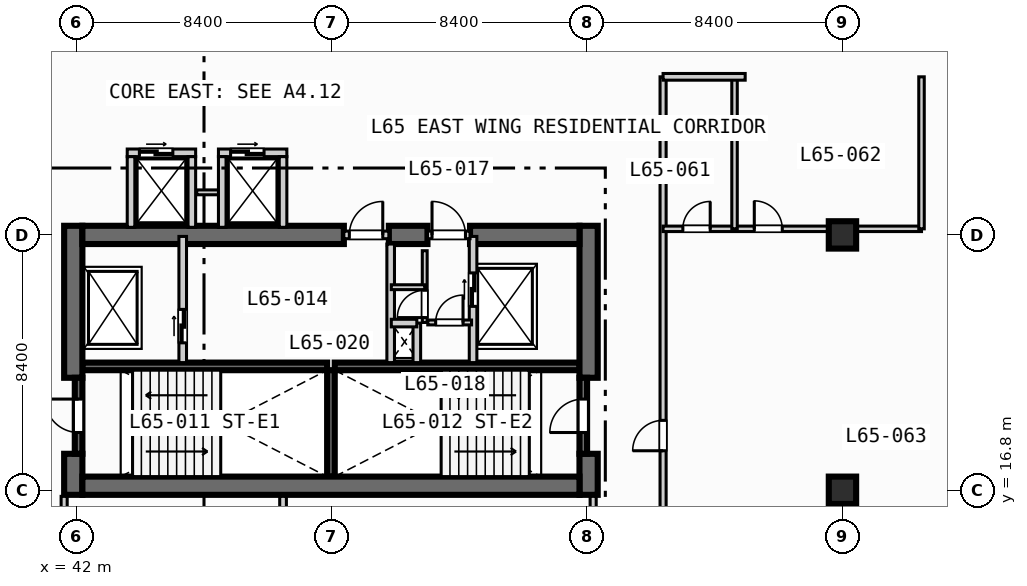
"""IFC4 building model, lengths in metres.
Left out: names, types, materials, properties, quantities, classifications, styles, units other than length and angle.
Written with IfcOpenShell. Run it as: python <this file> out.ifc"""

import sys

from ifc_helpers import new_model, si_unit, direction, frame, frame_2d, origin, origin_2d, place, context, subcontext, project, spatial, rectangle, extrude, element, fill, save


model = new_model("IFC4")
c1 = context("Model", 3, precision=1e-05, world=origin(), true_north=direction((0.0, 1.0)))
c2 = subcontext(c1, "Body", "Model", "MODEL_VIEW")
j1 = project(units=[si_unit("LENGTHUNIT", "METRE"), si_unit("PLANEANGLEUNIT", "RADIAN")], contexts=[c1])
p1 = place(None, origin())
s1 = spatial("IfcSite", under=j1, at=p1, CompositionType="ELEMENT")
p2 = place(p1, origin())
s2 = spatial("IfcBuilding", under=s1, at=p2, CompositionType="ELEMENT")
p3 = place(p2, frame((0.0, 0.0, 263.8)))
s3 = spatial("IfcBuildingStorey", under=s2, at=p3, CompositionType="ELEMENT", Elevation=263.8)
for number, where, z_axis, x_axis in (
    (1, (42.2, 20.875, 0.0), (0.0, 0.0, 1.0), (1.0, 0.0, 0.0)),
    (2, (50.5, 20.875, 0.0), (0.0, 0.0, 1.0), (1.0, 0.0, 0.0)),
):
    element("IfcWall", number, at=place(p3, frame(where, z_axis=z_axis, x_axis=x_axis)), inside=s3, PredefinedType="SOLIDWALL", context=c2, shape_type="SweptSolid", body=[
        extrude(rectangle(XDim=8.05, YDim=0.25, at=frame_2d((4.025, 0.0))), origin(), (0.0, 0.0, 1.0), 3.47),
    ])
p4 = place(p3, frame((50.375, 17.25, 0.0), z_axis=(0.0, 0.0, 1.0), x_axis=(0.0, 1.0, 0.0)))
e3 = element("IfcWall", 3, at=p4, inside=s3, PredefinedType="SOLIDWALL", context=c2, shape_type="SweptSolid", body=[
    extrude(rectangle(XDim=3.5, YDim=0.25, at=frame_2d((1.75, 0.0))), origin(), (0.0, 0.0, 1.0), 3.47),
])
p5 = place(p3, frame((41.9, 16.65, 0.0), z_axis=(0.0, 0.0, 1.0), x_axis=(0.0, 1.0, 0.0)))
e4 = element("IfcWall", 4, at=p5, inside=s3, PredefinedType="SHEAR", context=c2, shape_type="SweptSolid", body=[
    extrude(rectangle(XDim=1.35, YDim=0.6, at=frame_2d((0.675, 0.0))), origin(), (0.0, 0.0, 1.0), 3.47),
])
p6 = place(p3, frame((41.9, 20.5, 0.0), z_axis=(0.0, 0.0, 1.0), x_axis=(0.0, 1.0, 0.0)))
e5 = element("IfcWall", 5, at=p6, inside=s3, PredefinedType="SHEAR", context=c2, shape_type="SweptSolid", body=[
    extrude(rectangle(XDim=5.0, YDim=0.6, at=frame_2d((2.5, 0.0))), origin(), (0.0, 0.0, 1.0), 3.47),
])
p7 = place(p3, frame((58.85, 16.65, 0.0), z_axis=(0.0, 0.0, 1.0), x_axis=(0.0, 1.0, 0.0)))
e6 = element("IfcWall", 6, at=p7, inside=s3, PredefinedType="SHEAR", context=c2, shape_type="SweptSolid", body=[
    extrude(rectangle(XDim=1.35, YDim=0.6, at=frame_2d((0.675, 0.0))), origin(), (0.0, 0.0, 1.0), 3.47),
])
p8 = place(p3, frame((58.85, 20.5, 0.0), z_axis=(0.0, 0.0, 1.0), x_axis=(0.0, 1.0, 0.0)))
e7 = element("IfcWall", 7, at=p8, inside=s3, PredefinedType="SHEAR", context=c2, shape_type="SweptSolid", body=[
    extrude(rectangle(XDim=5.0, YDim=0.6, at=frame_2d((2.5, 0.0))), origin(), (0.0, 0.0, 1.0), 3.47),
])
p9 = place(p3, frame((42.2, 16.95, 0.0), z_axis=(0.0, 0.0, 1.0), x_axis=(1.0, 0.0, 0.0)))
e8 = element("IfcWall", 8, at=p9, inside=s3, PredefinedType="SHEAR", context=c2, shape_type="SweptSolid", body=[
    extrude(rectangle(XDim=16.35, YDim=0.6, at=frame_2d((8.175, 0.0))), origin(), (0.0, 0.0, 1.0), 3.47),
])
p10 = place(p3, frame((42.2, 25.2, 0.0), z_axis=(0.0, 0.0, 1.0), x_axis=(1.0, 0.0, 0.0)))
e9 = element("IfcWall", 9, at=p10, inside=s3, PredefinedType="SHEAR", context=c2, shape_type="SweptSolid", body=[
    extrude(rectangle(XDim=8.6, YDim=0.6, at=frame_2d((4.3, 0.0))), origin(), (0.0, 0.0, 1.0), 3.47),
])
p11 = place(p3, frame((52.28, 25.2, 0.0), z_axis=(0.0, 0.0, 1.0), x_axis=(1.0, 0.0, 0.0)))
e10 = element("IfcWall", 10, at=p11, inside=s3, PredefinedType="SHEAR", context=c2, shape_type="SweptSolid", body=[
    extrude(rectangle(XDim=1.27, YDim=0.6, at=frame_2d((0.635, 0.0))), origin(), (0.0, 0.0, 1.0), 3.47),
])
p12 = place(p3, frame((54.95, 25.2, 0.0), z_axis=(0.0, 0.0, 1.0), x_axis=(1.0, 0.0, 0.0)))
e11 = element("IfcWall", 11, at=p12, inside=s3, PredefinedType="SHEAR", context=c2, shape_type="SweptSolid", body=[
    extrude(rectangle(XDim=3.6, YDim=0.6, at=frame_2d((1.8, 0.0))), origin(), (0.0, 0.0, 1.0), 3.47),
])
for number, where, z_axis, x_axis in (
    (12, (67.2, 16.8, 0.0), (0.0, 0.0, 1.0), (1.0, 0.0, 0.0)),
    (13, (67.2, 25.2, 0.0), (0.0, 0.0, 1.0), (1.0, 0.0, 0.0)),
):
    element("IfcColumn", number, at=place(p3, frame(where, z_axis=z_axis, x_axis=x_axis)), inside=s3, PredefinedType="COLUMN", context=c2, shape_type="SweptSolid", body=[
        extrude(rectangle(XDim=0.9, YDim=0.9, at=origin_2d()), origin(), (0.0, 0.0, 1.0), 3.7),
    ])
p13 = place(p3, frame((42.075, 18.0, 0.0), z_axis=(0.0, 0.0, 1.0), x_axis=(0.0, 1.0, 0.0)))
e14 = element("IfcWall", 14, at=p13, inside=s3, PredefinedType="SOLIDWALL", context=c2, shape_type="SweptSolid", body=[
    extrude(rectangle(XDim=2.5, YDim=0.25, at=frame_2d((1.25, 0.0))), origin(), (0.0, 0.0, 1.0), 3.47),
])
p14 = place(p13, frame((0.7, 0.0, 0.0)))
e15 = element("IfcOpeningElement", 15, at=p14, cuts=e14, PredefinedType="OPENING", context=c2, shape_type="SweptSolid", body=[
    extrude(rectangle(XDim=1.1, YDim=2.15, at=frame_2d((0.55, 1.075))), frame((0.0, 0.135, 0.0), z_axis=(0.0, -1.0, 0.0), x_axis=(1.0, 0.0, 0.0)), (0.0, 0.0, 1.0), 0.27),
])
p15 = place(p3, frame((58.675, 18.0, 0.0), z_axis=(0.0, 0.0, 1.0), x_axis=(0.0, 1.0, 0.0)))
e16 = element("IfcWall", 16, at=p15, inside=s3, PredefinedType="SOLIDWALL", context=c2, shape_type="SweptSolid", body=[
    extrude(rectangle(XDim=2.5, YDim=0.25, at=frame_2d((1.25, 0.0))), origin(), (0.0, 0.0, 1.0), 3.47),
])
p16 = place(p15, frame((0.7, 0.0, 0.0)))
e17 = element("IfcOpeningElement", 17, at=p16, cuts=e16, PredefinedType="OPENING", context=c2, shape_type="SweptSolid", body=[
    extrude(rectangle(XDim=1.1, YDim=2.15, at=frame_2d((0.55, 1.075))), frame((0.0, 0.135, 0.0), z_axis=(0.0, -1.0, 0.0), x_axis=(1.0, 0.0, 0.0)), (0.0, 0.0, 1.0), 0.27),
])
p17 = place(p3, frame((45.5, 21.0, 0.0), z_axis=(0.0, 0.0, 1.0), x_axis=(0.0, 1.0, 0.0)))
e18 = element("IfcWall", 18, at=p17, inside=s3, PredefinedType="SOLIDWALL", context=c2, shape_type="SweptSolid", body=[
    extrude(rectangle(XDim=4.15, YDim=0.25, at=frame_2d((2.075, 0.0))), origin(), (0.0, 0.0, 1.0), 3.47),
])
p18 = place(p17, frame((0.65, 0.0, 0.0)))
e19 = element("IfcOpeningElement", 19, at=p18, cuts=e18, PredefinedType="OPENING", context=c2, shape_type="SweptSolid", body=[
    extrude(rectangle(XDim=1.1, YDim=2.15, at=frame_2d((0.55, 1.075))), frame((0.0, 0.135, 0.0), z_axis=(0.0, -1.0, 0.0), x_axis=(1.0, 0.0, 0.0)), (0.0, 0.0, 1.0), 0.27),
])
p19 = place(p3, frame((50.8, 25.2, 0.0), z_axis=(0.0, 0.0, 1.0), x_axis=(1.0, 0.0, 0.0)))
e20 = element("IfcWall", 20, at=p19, inside=s3, PredefinedType="SOLIDWALL", context=c2, shape_type="SweptSolid", body=[
    extrude(rectangle(XDim=1.48, YDim=0.25, at=frame_2d((0.74, 0.0))), origin(), (0.0, 0.0, 1.0), 3.47),
])
p20 = place(p19, frame((0.18, 0.0, 0.0)))
e21 = element("IfcOpeningElement", 21, at=p20, cuts=e20, PredefinedType="OPENING", context=c2, shape_type="SweptSolid", body=[
    extrude(rectangle(XDim=1.1, YDim=2.15, at=frame_2d((0.55, 1.075))), frame((0.0, 0.135, 0.0), z_axis=(0.0, -1.0, 0.0), x_axis=(1.0, 0.0, 0.0)), (0.0, 0.0, 1.0), 0.27),
])
p21 = place(p3, frame((52.34, 21.0, 0.0), z_axis=(0.0, 0.0, 1.0), x_axis=(0.0, 1.0, 0.0)))
e22 = element("IfcWall", 22, at=p21, inside=s3, PredefinedType="SOLIDWALL", context=c2, shape_type="SweptSolid", body=[
    extrude(rectangle(XDim=3.9, YDim=0.25, at=frame_2d((1.95, 0.0))), origin(), (0.0, 0.0, 1.0), 3.47),
])
p22 = place(p3, frame((55.05, 21.0, 0.0), z_axis=(0.0, 0.0, 1.0), x_axis=(0.0, 1.0, 0.0)))
e23 = element("IfcWall", 23, at=p22, inside=s3, PredefinedType="SOLIDWALL", context=c2, shape_type="SweptSolid", body=[
    extrude(rectangle(XDim=4.15, YDim=0.25, at=frame_2d((2.075, 0.0))), origin(), (0.0, 0.0, 1.0), 3.47),
])
p23 = place(p22, frame((1.85, 0.0, 0.0)))
e24 = element("IfcOpeningElement", 24, at=p23, cuts=e23, PredefinedType="OPENING", context=c2, shape_type="SweptSolid", body=[
    extrude(rectangle(XDim=1.1, YDim=2.15, at=frame_2d((0.55, 1.075))), frame((0.0, 0.135, 0.0), z_axis=(0.0, -1.0, 0.0), x_axis=(1.0, 0.0, 0.0)), (0.0, 0.0, 1.0), 0.27),
])
p24 = place(p3, frame((53.55, 25.2, 0.0), z_axis=(0.0, 0.0, 1.0), x_axis=(1.0, 0.0, 0.0)))
e25 = element("IfcWall", 25, at=p24, inside=s3, PredefinedType="SOLIDWALL", context=c2, shape_type="SweptSolid", body=[
    extrude(rectangle(XDim=1.4, YDim=0.25, at=frame_2d((0.7, 0.0))), origin(), (0.0, 0.0, 1.0), 3.47),
])
p25 = place(p24, frame((0.15, 0.0, 0.0)))
e26 = element("IfcOpeningElement", 26, at=p25, cuts=e25, PredefinedType="OPENING", context=c2, shape_type="SweptSolid", body=[
    extrude(rectangle(XDim=1.1, YDim=2.15, at=frame_2d((0.55, 1.075))), frame((0.0, 0.135, 0.0), z_axis=(0.0, -1.0, 0.0), x_axis=(1.0, 0.0, 0.0)), (0.0, 0.0, 1.0), 0.27),
])
p26 = place(p3, frame((53.2, 21.0, 0.0), z_axis=(0.0, 0.0, 1.0), x_axis=(0.0, 1.0, 0.0)))
e27 = element("IfcWall", 27, at=p26, inside=s3, PredefinedType="SOLIDWALL", context=c2, shape_type="SweptSolid", body=[
    extrude(rectangle(XDim=1.3, YDim=0.25, at=frame_2d((0.65, 0.0))), origin(), (0.0, 0.0, 1.0), 3.47),
])
p27 = place(p3, frame((52.36, 22.3, 0.0), z_axis=(0.0, 0.0, 1.0), x_axis=(1.0, 0.0, 0.0)))
e28 = element("IfcWall", 28, at=p27, inside=s3, PredefinedType="SOLIDWALL", context=c2, shape_type="SweptSolid", body=[
    extrude(rectangle(XDim=0.84, YDim=0.25, at=frame_2d((0.42, 0.0))), origin(), (0.0, 0.0, 1.0), 3.47),
])
p28 = place(p3, frame((53.56, 22.32, 0.0), z_axis=(0.0, 0.0, 1.0), x_axis=(1.0, 0.0, 0.0)))
e29 = element("IfcWall", 29, at=p28, inside=s3, PredefinedType="PARTITIONING", context=c2, shape_type="SweptSolid", body=[
    extrude(rectangle(XDim=1.44, YDim=0.16, at=frame_2d((0.72, 0.0))), origin(), (0.0, 0.0, 1.0), 3.47),
])
p29 = place(p28, frame((0.26, 0.0, 0.0)))
e30 = element("IfcOpeningElement", 30, at=p29, cuts=e29, PredefinedType="OPENING", context=c2, shape_type="SweptSolid", body=[
    extrude(rectangle(XDim=0.9, YDim=2.1, at=frame_2d((0.45, 1.05))), frame((0.0, 0.09, 0.0), z_axis=(0.0, -1.0, 0.0), x_axis=(1.0, 0.0, 0.0)), (0.0, 0.0, 1.0), 0.18),
])
p30 = place(p3, frame((53.46, 22.32, 0.0), z_axis=(0.0, 0.0, 1.0), x_axis=(0.0, 1.0, 0.0)))
e31 = element("IfcWall", 31, at=p30, inside=s3, PredefinedType="PARTITIONING", context=c2, shape_type="SweptSolid", body=[
    extrude(rectangle(XDim=2.36, YDim=0.16, at=frame_2d((1.18, 0.0))), origin(), (0.0, 0.0, 1.0), 3.47),
])
p31 = place(p30, frame((0.16, 0.0, 0.0)))
e32 = element("IfcOpeningElement", 32, at=p31, cuts=e31, PredefinedType="OPENING", context=c2, shape_type="SweptSolid", body=[
    extrude(rectangle(XDim=0.9, YDim=2.1, at=frame_2d((0.45, 1.05))), frame((0.0, 0.09, 0.0), z_axis=(0.0, -1.0, 0.0), x_axis=(1.0, 0.0, 0.0)), (0.0, 0.0, 1.0), 0.18),
])
p32 = place(p3, frame((52.36, 23.48, 0.0), z_axis=(0.0, 0.0, 1.0), x_axis=(1.0, 0.0, 0.0)))
e33 = element("IfcWall", 33, at=p32, inside=s3, PredefinedType="PARTITIONING", context=c2, shape_type="SweptSolid", body=[
    extrude(rectangle(XDim=1.1, YDim=0.16, at=frame_2d((0.55, 0.0))), origin(), (0.0, 0.0, 1.0), 3.47),
])
p33 = place(p3, frame((43.675, 27.9, 0.0), z_axis=(0.0, 0.0, 1.0), x_axis=(1.0, 0.0, 0.0)))
e34 = element("IfcWall", 34, at=p33, inside=s3, PredefinedType="SOLIDWALL", context=c2, shape_type="SweptSolid", body=[
    extrude(rectangle(XDim=2.25, YDim=0.25, at=frame_2d((1.125, 0.0))), origin(), (0.0, 0.0, 1.0), 3.47),
])
p34 = place(p33, frame((0.4, 0.0, 0.0)))
e35 = element("IfcOpeningElement", 35, at=p34, cuts=e34, PredefinedType="OPENING", context=c2, shape_type="SweptSolid", body=[
    extrude(rectangle(XDim=1.1, YDim=2.15, at=frame_2d((0.55, 1.075))), frame((0.0, 0.135, 0.0), z_axis=(0.0, -1.0, 0.0), x_axis=(1.0, 0.0, 0.0)), (0.0, 0.0, 1.0), 0.27),
])
for number, where, z_axis, x_axis in (
    (36, (43.8, 25.45, 0.0), (0.0, 0.0, 1.0), (0.0, 1.0, 0.0)),
    (37, (45.8, 25.45, 0.0), (0.0, 0.0, 1.0), (0.0, 1.0, 0.0)),
):
    element("IfcWall", number, at=place(p3, frame(where, z_axis=z_axis, x_axis=x_axis)), inside=s3, PredefinedType="SOLIDWALL", context=c2, shape_type="SweptSolid", body=[
        extrude(rectangle(XDim=2.325, YDim=0.25, at=frame_2d((1.163, 0.0))), origin(), (0.0, 0.0, 1.0), 3.47),
    ])
p35 = place(p3, frame((45.96, 26.6, 0.0), z_axis=(0.0, 0.0, 1.0), x_axis=(1.0, 0.0, 0.0)))
e38 = element("IfcWall", 38, at=p35, inside=s3, PredefinedType="PARTITIONING", context=c2, shape_type="SweptSolid", body=[
    extrude(rectangle(XDim=0.88, YDim=0.16, at=frame_2d((0.44, 0.0))), origin(), (0.0, 0.0, 1.0), 3.47),
])
p36 = place(p3, frame((46.675, 27.9, 0.0), z_axis=(0.0, 0.0, 1.0), x_axis=(1.0, 0.0, 0.0)))
e39 = element("IfcWall", 39, at=p36, inside=s3, PredefinedType="SOLIDWALL", context=c2, shape_type="SweptSolid", body=[
    extrude(rectangle(XDim=2.25, YDim=0.25, at=frame_2d((1.125, 0.0))), origin(), (0.0, 0.0, 1.0), 3.47),
])
p37 = place(p36, frame((0.4, 0.0, 0.0)))
e40 = element("IfcOpeningElement", 40, at=p37, cuts=e39, PredefinedType="OPENING", context=c2, shape_type="SweptSolid", body=[
    extrude(rectangle(XDim=1.1, YDim=2.15, at=frame_2d((0.55, 1.075))), frame((0.0, 0.135, 0.0), z_axis=(0.0, -1.0, 0.0), x_axis=(1.0, 0.0, 0.0)), (0.0, 0.0, 1.0), 0.27),
])
for number, where, z_axis, x_axis in (
    (41, (46.8, 25.45, 0.0), (0.0, 0.0, 1.0), (0.0, 1.0, 0.0)),
    (42, (48.8, 25.45, 0.0), (0.0, 0.0, 1.0), (0.0, 1.0, 0.0)),
):
    element("IfcWall", number, at=place(p3, frame(where, z_axis=z_axis, x_axis=x_axis)), inside=s3, PredefinedType="SOLIDWALL", context=c2, shape_type="SweptSolid", body=[
        extrude(rectangle(XDim=2.325, YDim=0.25, at=frame_2d((1.163, 0.0))), origin(), (0.0, 0.0, 1.0), 3.47),
    ])
p38 = place(p3, frame((41.6, 8.65, 0.0), z_axis=(0.0, 0.0, 1.0), x_axis=(0.0, 1.0, 0.0)))
e43 = element("IfcWall", 43, at=p38, inside=s3, PredefinedType="PARTITIONING", context=c2, shape_type="SweptSolid", body=[
    extrude(rectangle(XDim=7.95, YDim=0.2, at=frame_2d((3.975, 0.0))), origin(), (0.0, 0.0, 1.0), 3.47),
])
p39 = place(p38, frame((2.2, 0.0, 0.0)))
e44 = element("IfcOpeningElement", 44, at=p39, cuts=e43, PredefinedType="OPENING", context=c2, shape_type="SweptSolid", body=[
    extrude(rectangle(XDim=0.92, YDim=2.1, at=frame_2d((0.46, 1.05))), frame((0.0, 0.11, 0.0), z_axis=(0.0, -1.0, 0.0), x_axis=(1.0, 0.0, 0.0)), (0.0, 0.0, 1.0), 0.22),
])
p40 = place(p3, frame((59.0, 8.65, 0.0), z_axis=(0.0, 0.0, 1.0), x_axis=(0.0, 1.0, 0.0)))
e45 = element("IfcWall", 45, at=p40, inside=s3, PredefinedType="PARTITIONING", context=c2, shape_type="SweptSolid", body=[
    extrude(rectangle(XDim=7.95, YDim=0.2, at=frame_2d((3.975, 0.0))), origin(), (0.0, 0.0, 1.0), 2.82),
])
p41 = place(p40, frame((2.2, 0.0, 0.0)))
e46 = element("IfcOpeningElement", 46, at=p41, cuts=e45, PredefinedType="OPENING", context=c2, shape_type="SweptSolid", body=[
    extrude(rectangle(XDim=0.92, YDim=2.1, at=frame_2d((0.46, 1.05))), frame((0.0, 0.11, 0.0), z_axis=(0.0, -1.0, 0.0), x_axis=(1.0, 0.0, 0.0)), (0.0, 0.0, 1.0), 0.22),
])
p42 = place(p3, frame((48.8, 8.65, 0.0), z_axis=(0.0, 0.0, 1.0), x_axis=(0.0, 1.0, 0.0)))
e47 = element("IfcWall", 47, at=p42, inside=s3, PredefinedType="PARTITIONING", context=c2, shape_type="SweptSolid", body=[
    extrude(rectangle(XDim=7.95, YDim=0.22, at=frame_2d((3.975, 0.0))), origin(), (0.0, 0.0, 1.0), 3.47),
])
p43 = place(p3, frame((61.3, 11.6, 0.0), z_axis=(0.0, 0.0, 1.0), x_axis=(0.0, 1.0, 0.0)))
e48 = element("IfcWall", 48, at=p43, inside=s3, PredefinedType="PARTITIONING", context=c2, shape_type="SweptSolid", body=[
    extrude(rectangle(XDim=18.8, YDim=0.2, at=frame_2d((9.4, 0.0))), origin(), (0.0, 0.0, 1.0), 3.47),
])
p44 = place(p43, frame((6.5, 0.0, 0.0)))
e49 = element("IfcOpeningElement", 49, at=p44, cuts=e48, PredefinedType="OPENING", context=c2, shape_type="SweptSolid", body=[
    extrude(rectangle(XDim=1.0, YDim=2.15, at=frame_2d((0.5, 1.075))), frame((0.0, 0.11, 0.0), z_axis=(0.0, -1.0, 0.0), x_axis=(1.0, 0.0, 0.0)), (0.0, 0.0, 1.0), 0.22),
])
p45 = place(p3, frame((61.3, 25.4, 0.0), z_axis=(0.0, 0.0, 1.0), x_axis=(1.0, 0.0, 0.0)))
e50 = element("IfcWall", 50, at=p45, inside=s3, PredefinedType="PLUMBINGWALL", context=c2, shape_type="SweptSolid", body=[
    extrude(rectangle(XDim=8.5, YDim=0.18, at=frame_2d((4.25, 0.0))), origin(), (0.0, 0.0, 1.0), 2.82),
])
p46 = place(p45, frame((0.65, 0.0, 0.0)))
e51 = element("IfcOpeningElement", 51, at=p46, cuts=e50, PredefinedType="OPENING", context=c2, shape_type="SweptSolid", body=[
    extrude(rectangle(XDim=0.9, YDim=2.1, at=frame_2d((0.45, 1.05))), frame((0.0, 0.1, 0.0), z_axis=(0.0, -1.0, 0.0), x_axis=(1.0, 0.0, 0.0)), (0.0, 0.0, 1.0), 0.2),
])
p47 = place(p45, frame((3.0, 0.0, 0.0)))
e52 = element("IfcOpeningElement", 52, at=p47, cuts=e50, PredefinedType="OPENING", context=c2, shape_type="SweptSolid", body=[
    extrude(rectangle(XDim=0.92, YDim=2.1, at=frame_2d((0.46, 1.05))), frame((0.0, 0.1, 0.0), z_axis=(0.0, -1.0, 0.0), x_axis=(1.0, 0.0, 0.0)), (0.0, 0.0, 1.0), 0.2),
])
for number, where, z_axis, x_axis in (
    (53, (63.65, 25.4, 0.0), (0.0, 0.0, 1.0), (0.0, 1.0, 0.0)),
    (54, (69.8, 25.4, 0.0), (0.0, 0.0, 1.0), (0.0, 1.0, 0.0)),
):
    element("IfcWall", number, at=place(p3, frame(where, z_axis=z_axis, x_axis=x_axis)), inside=s3, PredefinedType="PLUMBINGWALL", context=c2, shape_type="SweptSolid", body=[
        extrude(rectangle(XDim=5.0, YDim=0.18, at=frame_2d((2.5, 0.0))), origin(), (0.0, 0.0, 1.0), 3.47),
    ])
p48 = place(p3, frame((61.3, 30.4, 0.0), z_axis=(0.0, 0.0, 1.0), x_axis=(1.0, 0.0, 0.0)))
e55 = element("IfcWall", 55, at=p48, inside=s3, PredefinedType="PARTITIONING", context=c2, shape_type="SweptSolid", body=[
    extrude(rectangle(XDim=2.7, YDim=0.22, at=frame_2d((1.35, 0.0))), origin(), (0.0, 0.0, 1.0), 3.47),
])
p49 = place(p14, origin())
e56 = element("IfcDoor", 56, at=p49, inside=s3, OperationType="SINGLE_SWING_RIGHT", PredefinedType="DOOR", context=c2, shape_type="SweptSolid", body=[
    extrude(rectangle(XDim=1.1, YDim=2.15, at=frame_2d((0.55, 1.075))), frame((0.0, 0.025, 0.0), z_axis=(0.0, -1.0, 0.0), x_axis=(1.0, 0.0, 0.0)), (0.0, 0.0, 1.0), 0.05),
])
fill(e15, e56)
p50 = place(p16, origin())
e57 = element("IfcDoor", 57, at=p50, inside=s3, OperationType="SINGLE_SWING_LEFT", PredefinedType="DOOR", context=c2, shape_type="SweptSolid", body=[
    extrude(rectangle(XDim=1.1, YDim=2.15, at=frame_2d((0.55, 1.075))), frame((0.0, 0.025, 0.0), z_axis=(0.0, -1.0, 0.0), x_axis=(1.0, 0.0, 0.0)), (0.0, 0.0, 1.0), 0.05),
])
fill(e17, e57)
p51 = place(p18, origin())
e58 = element("IfcDoor", 58, at=p51, inside=s3, OperationType="SLIDING_TO_LEFT", PredefinedType="DOOR", context=c2, shape_type="SweptSolid", body=[
    extrude(rectangle(XDim=1.1, YDim=2.15, at=frame_2d((0.55, 1.075))), frame((0.0, 0.025, 0.0), z_axis=(0.0, -1.0, 0.0), x_axis=(1.0, 0.0, 0.0)), (0.0, 0.0, 1.0), 0.05),
])
fill(e19, e58)
p52 = place(p20, origin())
e59 = element("IfcDoor", 59, at=p52, inside=s3, OperationType="SINGLE_SWING_RIGHT", PredefinedType="DOOR", context=c2, shape_type="SweptSolid", body=[
    extrude(rectangle(XDim=1.1, YDim=2.15, at=frame_2d((0.55, 1.075))), frame((0.0, 0.025, 0.0), z_axis=(0.0, -1.0, 0.0), x_axis=(1.0, 0.0, 0.0)), (0.0, 0.0, 1.0), 0.05),
])
fill(e21, e59)
p53 = place(p23, origin())
e60 = element("IfcDoor", 60, at=p53, inside=s3, OperationType="SLIDING_TO_LEFT", PredefinedType="DOOR", context=c2, shape_type="SweptSolid", body=[
    extrude(rectangle(XDim=1.1, YDim=2.15, at=frame_2d((0.55, 1.075))), frame((0.0, 0.025, 0.0), z_axis=(0.0, -1.0, 0.0), x_axis=(1.0, 0.0, 0.0)), (0.0, 0.0, 1.0), 0.05),
])
fill(e24, e60)
p54 = place(p25, origin())
e61 = element("IfcDoor", 61, at=p54, inside=s3, OperationType="SINGLE_SWING_LEFT", PredefinedType="DOOR", context=c2, shape_type="SweptSolid", body=[
    extrude(rectangle(XDim=1.1, YDim=2.15, at=frame_2d((0.55, 1.075))), frame((0.0, 0.025, 0.0), z_axis=(0.0, -1.0, 0.0), x_axis=(1.0, 0.0, 0.0)), (0.0, 0.0, 1.0), 0.05),
])
fill(e26, e61)
p55 = place(p29, origin())
e62 = element("IfcDoor", 62, at=p55, inside=s3, OperationType="SINGLE_SWING_RIGHT", PredefinedType="DOOR", context=c2, shape_type="SweptSolid", body=[
    extrude(rectangle(XDim=0.9, YDim=2.1, at=frame_2d((0.45, 1.05))), frame((0.0, 0.025, 0.0), z_axis=(0.0, -1.0, 0.0), x_axis=(1.0, 0.0, 0.0)), (0.0, 0.0, 1.0), 0.05),
])
fill(e30, e62)
p56 = place(p31, origin())
e63 = element("IfcDoor", 63, at=p56, inside=s3, OperationType="SINGLE_SWING_LEFT", PredefinedType="DOOR", context=c2, shape_type="SweptSolid", body=[
    extrude(rectangle(XDim=0.9, YDim=2.1, at=frame_2d((0.45, 1.05))), frame((0.0, 0.025, 0.0), z_axis=(0.0, -1.0, 0.0), x_axis=(1.0, 0.0, 0.0)), (0.0, 0.0, 1.0), 0.05),
])
fill(e32, e63)
p57 = place(p34, origin())
e64 = element("IfcDoor", 64, at=p57, inside=s3, OperationType="SLIDING_TO_LEFT", PredefinedType="DOOR", context=c2, shape_type="SweptSolid", body=[
    extrude(rectangle(XDim=1.1, YDim=2.15, at=frame_2d((0.55, 1.075))), frame((0.0, 0.025, 0.0), z_axis=(0.0, -1.0, 0.0), x_axis=(1.0, 0.0, 0.0)), (0.0, 0.0, 1.0), 0.05),
])
fill(e35, e64)
p58 = place(p37, origin())
e65 = element("IfcDoor", 65, at=p58, inside=s3, OperationType="SLIDING_TO_LEFT", PredefinedType="DOOR", context=c2, shape_type="SweptSolid", body=[
    extrude(rectangle(XDim=1.1, YDim=2.15, at=frame_2d((0.55, 1.075))), frame((0.0, 0.025, 0.0), z_axis=(0.0, -1.0, 0.0), x_axis=(1.0, 0.0, 0.0)), (0.0, 0.0, 1.0), 0.05),
])
fill(e40, e65)
p59 = place(p44, origin())
e66 = element("IfcDoor", 66, at=p59, inside=s3, OperationType="SINGLE_SWING_LEFT", PredefinedType="DOOR", context=c2, shape_type="SweptSolid", body=[
    extrude(rectangle(XDim=1.0, YDim=2.15, at=frame_2d((0.5, 1.075))), frame((0.0, 0.025, 0.0), z_axis=(0.0, -1.0, 0.0), x_axis=(1.0, 0.0, 0.0)), (0.0, 0.0, 1.0), 0.05),
])
fill(e49, e66)
p60 = place(p46, origin())
e67 = element("IfcDoor", 67, at=p60, inside=s3, OperationType="SINGLE_SWING_RIGHT", PredefinedType="DOOR", context=c2, shape_type="SweptSolid", body=[
    extrude(rectangle(XDim=0.9, YDim=2.1, at=frame_2d((0.45, 1.05))), frame((0.0, 0.025, 0.0), z_axis=(0.0, -1.0, 0.0), x_axis=(1.0, 0.0, 0.0)), (0.0, 0.0, 1.0), 0.05),
])
fill(e51, e67)
p61 = place(p47, origin())
e68 = element("IfcDoor", 68, at=p61, inside=s3, OperationType="SINGLE_SWING_LEFT", PredefinedType="DOOR", context=c2, shape_type="SweptSolid", body=[
    extrude(rectangle(XDim=0.92, YDim=2.1, at=frame_2d((0.46, 1.05))), frame((0.0, 0.025, 0.0), z_axis=(0.0, -1.0, 0.0), x_axis=(1.0, 0.0, 0.0)), (0.0, 0.0, 1.0), 0.05),
])
fill(e52, e68)
save(model, sys.argv[1])
